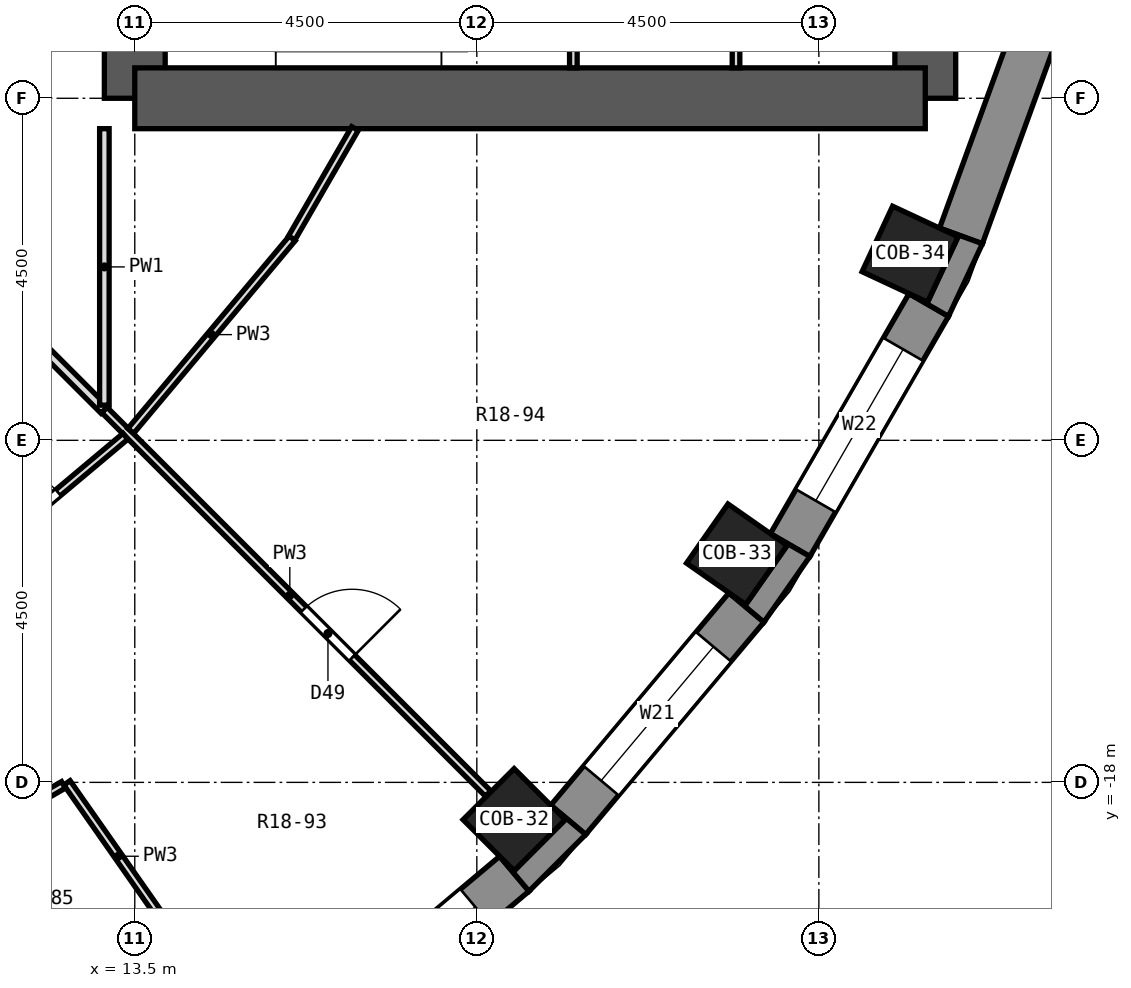
"""IFC4 building model, lengths in metres.
Left out: names, types, materials, properties, quantities, classifications, styles, units other than length and angle.
Written with IfcOpenShell. Run it as: python <this file> out.ifc"""

import sys

from ifc_helpers import new_model, si_unit, direction, frame, frame_2d, origin, origin_2d, place, context, subcontext, project, spatial, polyline, rectangle, outline, extrude, element, fill, save


model = new_model("IFC4")
c1 = context("Model", 3, precision=1e-05, world=origin(), true_north=direction((0.0, 1.0)))
c2 = subcontext(c1, "Body", "Model", "MODEL_VIEW")
j1 = project(units=[si_unit("LENGTHUNIT", "METRE"), si_unit("PLANEANGLEUNIT", "RADIAN")], contexts=[c1])
p1 = place(None, origin())
s1 = spatial("IfcSite", under=j1, at=p1, CompositionType="ELEMENT")
p2 = place(p1, origin())
s2 = spatial("IfcBuilding", under=s1, at=p2, CompositionType="ELEMENT")
p3 = place(p2, frame((0.0, 0.0, 101.8)))
s3 = spatial("IfcBuildingStorey", under=s2, at=p3, CompositionType="ELEMENT", Elevation=101.8)
for number, where, z_axis, x_axis in (
    (1, (18.491, -18.491, 0.0), (0.0, 0.0, 1.0), (0.707, -0.707, 0.0)),
    (2, (21.421, -14.999, 0.0), (0.0, 0.0, 1.0), (0.819, -0.574, 0.0)),
    (3, (23.7, -11.052, 0.0), (0.0, 0.0, 1.0), (0.906, -0.423, 0.0)),
):
    element("IfcColumn", number, at=place(p3, frame(where, z_axis=z_axis, x_axis=x_axis)), inside=s3, PredefinedType="COLUMN", context=c2, shape_type="SweptSolid", body=[
        extrude(rectangle(XDim=0.95, YDim=0.95, at=origin_2d()), origin(), (0.0, 0.0, 1.0), 3.3),
    ])
p4 = place(p3, frame((13.5, -9.0, 0.0), z_axis=(0.0, 0.0, 1.0), x_axis=(0.0, 1.0, 0.0)))
e4 = element("IfcWall", 4, at=p4, inside=s3, PredefinedType="SHEAR", context=c2, shape_type="SweptSolid", body=[
    extrude(rectangle(XDim=18.0, YDim=0.8, at=frame_2d((9.0, 0.0))), origin(), (0.0, 0.0, 1.0), 3.3),
])
p5 = place(p4, frame((15.4, 0.0, 0.0)))
e5 = element("IfcOpeningElement", 5, at=p5, cuts=e4, PredefinedType="OPENING", context=c2, shape_type="SweptSolid", body=[
    extrude(rectangle(XDim=1.2, YDim=2.1, at=frame_2d((0.6, 1.05))), frame((0.0, 0.412, 0.0), z_axis=(0.0, -1.0, 0.0), x_axis=(1.0, 0.0, 0.0)), (0.0, 0.0, 1.0), 0.824),
])
p6 = place(p4, frame((1.4, 0.0, 0.0)))
e6 = element("IfcOpeningElement", 6, at=p6, cuts=e4, PredefinedType="OPENING", context=c2, shape_type="SweptSolid", body=[
    extrude(rectangle(XDim=1.2, YDim=2.1, at=frame_2d((0.6, 1.05))), frame((0.0, 0.412, 0.0), z_axis=(0.0, -1.0, 0.0), x_axis=(1.0, 0.0, 0.0)), (0.0, 0.0, 1.0), 0.824),
])
p7 = place(p4, frame((7.5, 0.0, 0.0)))
e7 = element("IfcOpeningElement", 7, at=p7, cuts=e4, PredefinedType="OPENING", context=c2, shape_type="SweptSolid", body=[
    extrude(rectangle(XDim=3.0, YDim=2.4, at=frame_2d((1.5, 1.2))), frame((0.0, 0.412, 0.0), z_axis=(0.0, -1.0, 0.0), x_axis=(1.0, 0.0, 0.0)), (0.0, 0.0, 1.0), 0.824),
])
p8 = place(p3, frame((23.9, -9.0, 0.0), z_axis=(0.0, 0.0, 1.0), x_axis=(0.0, 1.0, 0.0)))
e8 = element("IfcWall", 8, at=p8, inside=s3, PredefinedType="SHEAR", context=c2, shape_type="SweptSolid", body=[
    extrude(rectangle(XDim=18.0, YDim=0.8, at=frame_2d((9.0, 0.0))), origin(), (0.0, 0.0, 1.0), 3.3),
])
p9 = place(p3, frame((13.5, -9.0, 0.0), z_axis=(0.0, 0.0, 1.0), x_axis=(1.0, 0.0, 0.0)))
e9 = element("IfcWall", 9, at=p9, inside=s3, PredefinedType="SHEAR", context=c2, shape_type="SweptSolid", body=[
    extrude(rectangle(XDim=10.4, YDim=0.8, at=frame_2d((5.2, 0.0))), origin(), (0.0, 0.0, 1.0), 3.3),
])
p10 = place(p3, frame((15.699, -21.547, 0.0), z_axis=(0.0, 0.0, 1.0), x_axis=(0.766055462616, 0.642774476932, 0.0)))
e10 = element("IfcWall", 10, at=p10, inside=s3, PredefinedType="SOLIDWALL", context=c2, shape_type="SweptSolid", body=[
    extrude(rectangle(XDim=3.648, YDim=0.6, at=frame_2d((1.824, 0.0))), origin(), (0.0, 0.0, 1.0), 2.8),
])
p11 = place(p10, frame((0.674, 0.0, 0.9)))
e11 = element("IfcOpeningElement", 11, at=p11, cuts=e10, PredefinedType="OPENING", context=c2, shape_type="SweptSolid", body=[
    extrude(rectangle(XDim=2.3, YDim=1.8, at=frame_2d((1.15, 0.9))), frame((0.0, 0.312, 0.0), z_axis=(0.0, -1.0, 0.0), x_axis=(1.0, 0.0, 0.0)), (0.0, 0.0, 1.0), 0.624),
])
p12 = place(p3, frame((19.202, -18.494, 0.0), z_axis=(0.0, 0.0, 1.0), x_axis=(0.642774476932, 0.766055462616, 0.0)))
e12 = element("IfcWall", 12, at=p12, inside=s3, PredefinedType="SOLIDWALL", context=c2, shape_type="SweptSolid", body=[
    extrude(rectangle(XDim=3.648, YDim=0.6, at=frame_2d((1.824, 0.0))), origin(), (0.0, 0.0, 1.0), 2.8),
])
p13 = place(p12, frame((0.674, 0.0, 0.9)))
e13 = element("IfcOpeningElement", 13, at=p13, cuts=e12, PredefinedType="OPENING", context=c2, shape_type="SweptSolid", body=[
    extrude(rectangle(XDim=2.3, YDim=1.8, at=frame_2d((1.15, 0.9))), frame((0.0, 0.312, 0.0), z_axis=(0.0, -1.0, 0.0), x_axis=(1.0, 0.0, 0.0)), (0.0, 0.0, 1.0), 0.624),
])
p14 = place(p3, frame((22.122, -14.878, 0.0), z_axis=(0.0, 0.0, 1.0), x_axis=(0.499954196102, 0.866051847062, 0.0)))
e14 = element("IfcWall", 14, at=p14, inside=s3, PredefinedType="SOLIDWALL", context=c2, shape_type="SweptSolid", body=[
    extrude(rectangle(XDim=3.648, YDim=0.6, at=frame_2d((1.824, 0.0))), origin(), (0.0, 0.0, 1.0), 2.8),
])
p15 = place(p14, frame((0.674, 0.0, 0.9)))
e15 = element("IfcOpeningElement", 15, at=p15, cuts=e14, PredefinedType="OPENING", context=c2, shape_type="SweptSolid", body=[
    extrude(rectangle(XDim=2.3, YDim=1.8, at=frame_2d((1.15, 0.9))), frame((0.0, 0.312, 0.0), z_axis=(0.0, -1.0, 0.0), x_axis=(1.0, 0.0, 0.0)), (0.0, 0.0, 1.0), 0.624),
])
p16 = place(p3, frame((24.369, -10.811, 0.0), z_axis=(0.0, 0.0, 1.0), x_axis=(0.341990236633, 0.939703505393, 0.0)))
e16 = element("IfcWall", 16, at=p16, inside=s3, PredefinedType="SOLIDWALL", context=c2, shape_type="SweptSolid", body=[
    extrude(rectangle(XDim=3.648, YDim=0.6, at=frame_2d((1.824, 0.0))), origin(), (0.0, 0.0, 1.0), 2.8),
])
p17 = place(p3, origin())
e17 = element("IfcWall", 17, at=p17, inside=s3, PredefinedType="SOLIDWALL", context=c2, shape_type="SweptSolid", body=[
    extrude(outline(polyline([(18.686, -19.432), (19.432, -18.686), (18.972, -18.301), (19.163, -18.491), (18.491, -19.163), (18.301, -18.972), (18.686, -19.432)])), origin(), (0.0, 0.0, 1.0), 2.8),
])
p18 = place(p3, origin())
e18 = element("IfcWall", 18, at=p18, inside=s3, PredefinedType="SOLIDWALL", context=c2, shape_type="SweptSolid", body=[
    extrude(outline(polyline([(22.382, -15.028), (21.862, -14.728), (22.083, -14.882), (21.538, -15.661), (21.317, -15.506), (21.777, -15.892), (22.382, -15.028)])), origin(), (0.0, 0.0, 1.0), 2.8),
])
p19 = place(p3, origin())
e19 = element("IfcWall", 19, at=p19, inside=s3, PredefinedType="SOLIDWALL", context=c2, shape_type="SweptSolid", body=[
    extrude(outline(polyline([(24.651, -10.913), (24.087, -10.708), (24.331, -10.822), (23.93, -11.683), (23.686, -11.569), (24.206, -11.869), (24.651, -10.913)])), origin(), (0.0, 0.0, 1.0), 2.8),
])
p20 = place(p3, frame((12.608, -18.006, 0.0), z_axis=(0.0, 0.0, 1.0), x_axis=(0.573573515593, -0.819154089418, 0.0)))
e20 = element("IfcWall", 20, at=p20, inside=s3, PredefinedType="PARTITIONING", context=c2, shape_type="SweptSolid", body=[
    extrude(rectangle(XDim=2.358, YDim=0.1, at=frame_2d((1.179, 0.0))), origin(), (0.0, 0.0, 1.0), 2.8),
])
p21 = place(p3, frame((13.1, -13.1, 0.0), z_axis=(0.0, 0.0, 1.0), x_axis=(0.707192272448, -0.707021279588, 0.0)))
e21 = element("IfcWall", 21, at=p21, inside=s3, PredefinedType="PARTITIONING", context=c2, shape_type="SweptSolid", body=[
    extrude(rectangle(XDim=7.139, YDim=0.1, at=frame_2d((3.569, 0.0))), origin(), (0.0, 0.0, 1.0), 2.8),
])
p22 = place(p21, frame((3.71, 0.0, 0.0)))
e22 = element("IfcOpeningElement", 22, at=p22, cuts=e21, PredefinedType="OPENING", context=c2, shape_type="SweptSolid", body=[
    extrude(rectangle(XDim=0.9, YDim=2.1, at=frame_2d((0.45, 1.05))), frame((0.0, 0.062, 0.0), z_axis=(0.0, -1.0, 0.0), x_axis=(1.0, 0.0, 0.0)), (0.0, 0.0, 1.0), 0.124),
])
p23 = place(p3, frame((8.092, -8.092, 0.0), z_axis=(0.0, 0.0, 1.0), x_axis=(0.707106781187, -0.707106781187, 0.0)))
e23 = element("IfcWall", 23, at=p23, inside=s3, PredefinedType="PARTITIONING", context=c2, shape_type="SweptSolid", body=[
    extrude(rectangle(XDim=7.083, YDim=0.125, at=frame_2d((3.541, 0.0))), origin(), (0.0, 0.0, 1.0), 2.8),
])
p24 = place(p3, frame((10.741, -19.083, 0.0), z_axis=(0.0, 0.0, 1.0), x_axis=(0.86618365172, 0.499725806311, 0.0)))
e24 = element("IfcWall", 24, at=p24, inside=s3, PredefinedType="PARTITIONING", context=c2, shape_type="SweptSolid", body=[
    extrude(rectangle(XDim=2.101, YDim=0.1, at=frame_2d((1.051, 0.0))), origin(), (0.0, 0.0, 1.0), 2.8),
])
p25 = place(p3, frame((10.919, -15.508, 0.0), z_axis=(0.0, 0.0, 1.0), x_axis=(0.766214515486, 0.642584870861, 0.0)))
e25 = element("IfcWall", 25, at=p25, inside=s3, PredefinedType="PARTITIONING", context=c2, shape_type="SweptSolid", body=[
    extrude(rectangle(XDim=3.207, YDim=0.1, at=frame_2d((1.604, 0.0))), origin(), (0.0, 0.0, 1.0), 2.8),
])
p26 = place(p25, frame((1.154, 0.0, 0.0)))
e26 = element("IfcOpeningElement", 26, at=p26, cuts=e25, PredefinedType="OPENING", context=c2, shape_type="SweptSolid", body=[
    extrude(rectangle(XDim=0.9, YDim=2.1, at=frame_2d((0.45, 1.05))), frame((0.0, 0.062, 0.0), z_axis=(0.0, -1.0, 0.0), x_axis=(1.0, 0.0, 0.0)), (0.0, 0.0, 1.0), 0.124),
])
p27 = place(p3, frame((13.447, -13.377, 0.0), z_axis=(0.0, 0.0, 1.0), x_axis=(0.642547967595, 0.76624546285, 0.0)))
e27 = element("IfcWall", 27, at=p27, inside=s3, PredefinedType="PARTITIONING", context=c2, shape_type="SweptSolid", body=[
    extrude(rectangle(XDim=3.308, YDim=0.1, at=frame_2d((1.654, 0.0))), origin(), (0.0, 0.0, 1.0), 2.8),
])
p28 = place(p3, frame((15.565, -10.838, 0.0), z_axis=(0.0, 0.0, 1.0), x_axis=(0.500370548049, 0.865811362044, 0.0)))
e28 = element("IfcWall", 28, at=p28, inside=s3, PredefinedType="PARTITIONING", context=c2, shape_type="SweptSolid", body=[
    extrude(rectangle(XDim=1.663, YDim=0.1, at=frame_2d((0.832, 0.0))), origin(), (0.0, 0.0, 1.0), 2.8),
])
p29 = place(p3, frame((13.1, -13.038, 0.0), z_axis=(0.0, 0.0, 1.0), x_axis=(0.0, 1.0, 0.0)))
e29 = element("IfcWall", 29, at=p29, inside=s3, PredefinedType="PARTITIONING", context=c2, shape_type="SweptSolid", body=[
    extrude(rectangle(XDim=3.638, YDim=0.125, at=frame_2d((1.819, 0.0))), origin(), (0.0, 0.0, 1.0), 2.8),
])
for number, where, z_axis, x_axis in (
    (30, (19.27, -8.6, 0.0), (0.0, 0.0, 1.0), (0.0, 1.0, 0.0)),
    (31, (21.41, -8.6, 0.0), (0.0, 0.0, 1.0), (0.0, 1.0, 0.0)),
):
    element("IfcWall", number, at=place(p3, frame(where, z_axis=z_axis, x_axis=x_axis)), inside=s3, PredefinedType="PARTITIONING", context=c2, shape_type="SweptSolid", body=[
        extrude(rectangle(XDim=3.35, YDim=0.1, at=frame_2d((1.675, 0.0))), origin(), (0.0, 0.0, 1.0), 2.8),
    ])
p30 = place(p11, origin())
e32 = element("IfcWindow", 32, at=p30, inside=s3, PartitioningType="SINGLE_PANEL", PredefinedType="WINDOW", context=c2, shape_type="SweptSolid", body=[
    extrude(rectangle(XDim=2.3, YDim=1.8, at=frame_2d((1.15, 0.9))), frame((0.0, 0.18, 0.0), z_axis=(0.0, -1.0, 0.0), x_axis=(1.0, 0.0, 0.0)), (0.0, 0.0, 1.0), 0.06),
])
fill(e11, e32)
p31 = place(p13, origin())
e33 = element("IfcWindow", 33, at=p31, inside=s3, PartitioningType="SINGLE_PANEL", PredefinedType="WINDOW", context=c2, shape_type="SweptSolid", body=[
    extrude(rectangle(XDim=2.3, YDim=1.8, at=frame_2d((1.15, 0.9))), frame((0.0, 0.18, 0.0), z_axis=(0.0, -1.0, 0.0), x_axis=(1.0, 0.0, 0.0)), (0.0, 0.0, 1.0), 0.06),
])
fill(e13, e33)
p32 = place(p15, origin())
e34 = element("IfcWindow", 34, at=p32, inside=s3, PartitioningType="SINGLE_PANEL", PredefinedType="WINDOW", context=c2, shape_type="SweptSolid", body=[
    extrude(rectangle(XDim=2.3, YDim=1.8, at=frame_2d((1.15, 0.9))), frame((0.0, 0.18, 0.0), z_axis=(0.0, -1.0, 0.0), x_axis=(1.0, 0.0, 0.0)), (0.0, 0.0, 1.0), 0.06),
])
fill(e15, e34)
p33 = place(p26, origin())
e35 = element("IfcDoor", 35, at=p33, inside=s3, OperationType="SINGLE_SWING_LEFT", PredefinedType="DOOR", context=c2, shape_type="SweptSolid", body=[
    extrude(rectangle(XDim=0.9, YDim=2.1, at=frame_2d((0.45, 1.05))), frame((0.0, 0.025, 0.0), z_axis=(0.0, -1.0, 0.0), x_axis=(1.0, 0.0, 0.0)), (0.0, 0.0, 1.0), 0.05),
])
fill(e26, e35)
p34 = place(p22, origin())
e36 = element("IfcDoor", 36, at=p34, inside=s3, OperationType="SINGLE_SWING_RIGHT", PredefinedType="DOOR", context=c2, shape_type="SweptSolid", body=[
    extrude(rectangle(XDim=0.9, YDim=2.1, at=frame_2d((0.45, 1.05))), frame((0.0, 0.025, 0.0), z_axis=(0.0, -1.0, 0.0), x_axis=(1.0, 0.0, 0.0)), (0.0, 0.0, 1.0), 0.05),
])
fill(e22, e36)
save(model, sys.argv[1])
